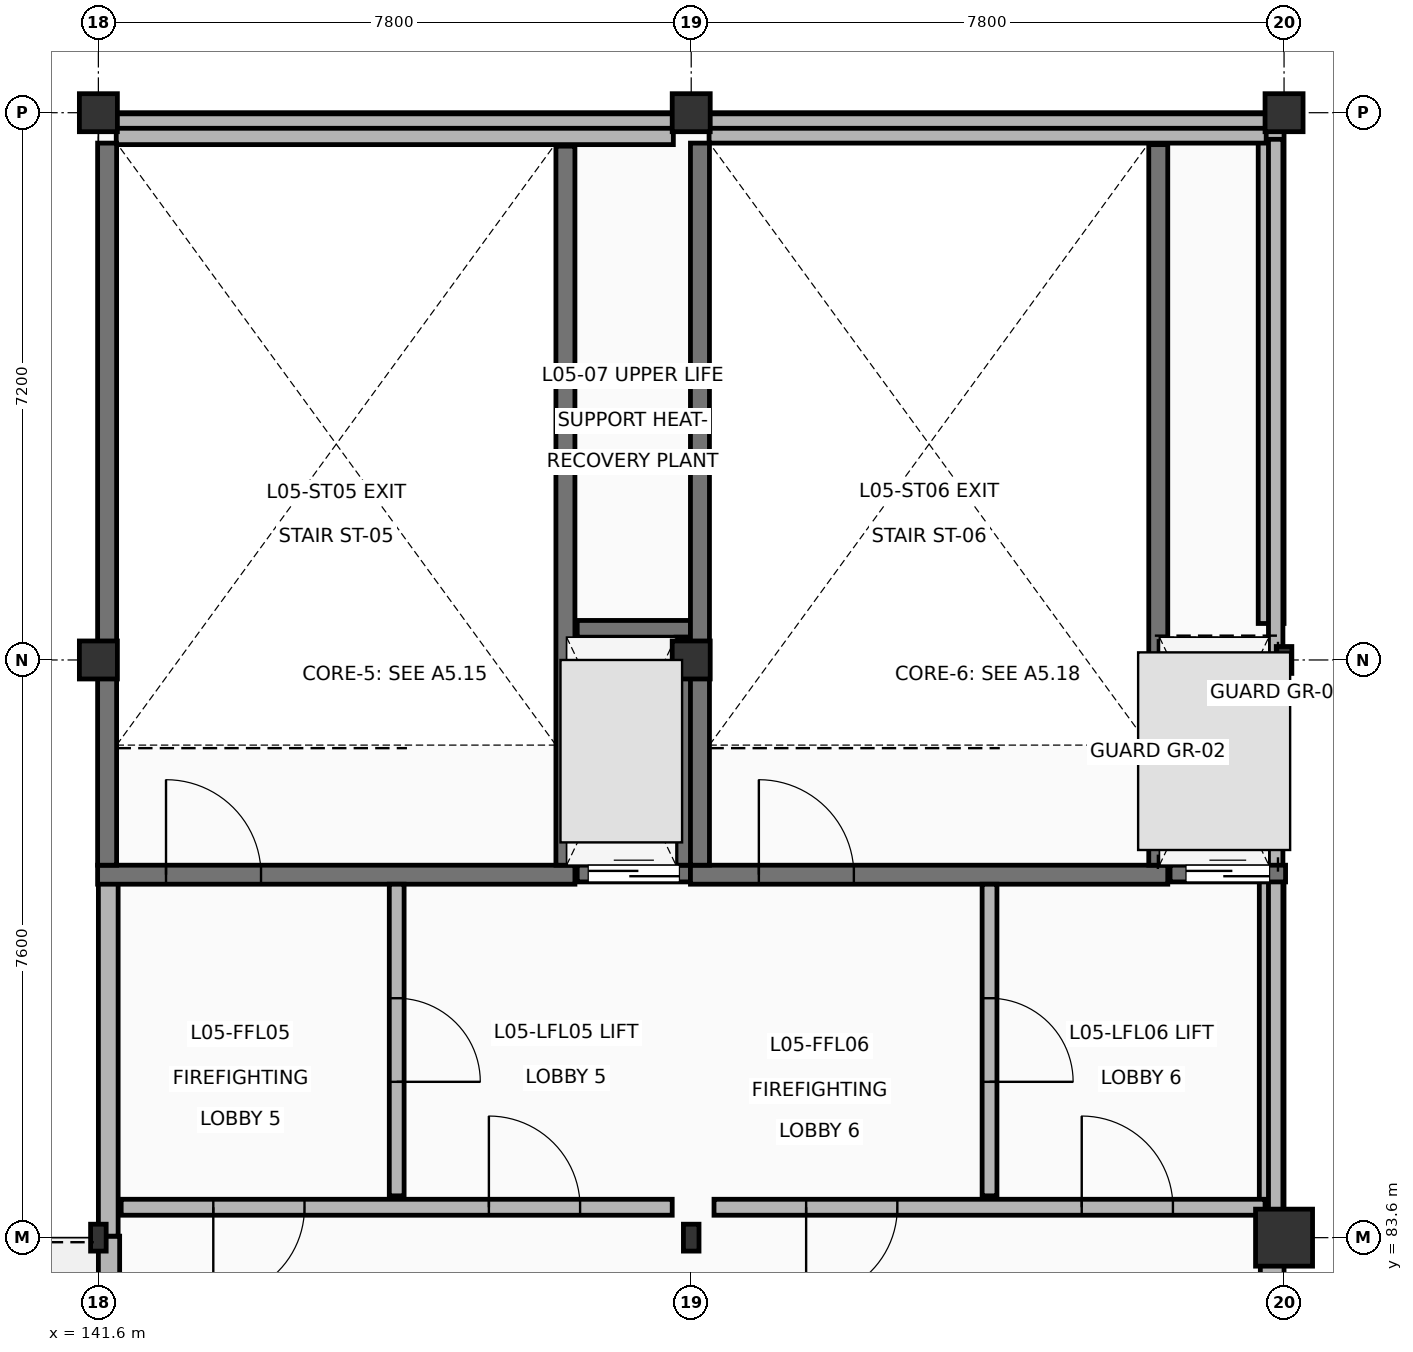
"""IFC4 building model, lengths in metres.
Left out: names, types, materials, properties, quantities, classifications, styles, units other than length and angle.
Written with IfcOpenShell. Run it as: python <this file> out.ifc"""

import sys

from ifc_helpers import new_model, si_unit, direction, frame, frame_2d, origin, origin_2d, place, context, subcontext, project, spatial, rectangle, circle, i_section, extrude, element, fill, save


model = new_model("IFC4")
c1 = context("Model", 3, precision=1e-05, world=origin(), true_north=direction((0.0, 1.0)))
c2 = subcontext(c1, "Body", "Model", "MODEL_VIEW")
j1 = project(units=[si_unit("LENGTHUNIT", "METRE"), si_unit("PLANEANGLEUNIT", "RADIAN")], contexts=[c1])
p1 = place(None, origin())
s1 = spatial("IfcSite", under=j1, at=p1, CompositionType="ELEMENT")
p2 = place(p1, origin())
s2 = spatial("IfcBuilding", under=s1, at=p2, CompositionType="ELEMENT")
p3 = place(p2, frame((0.0, 0.0, 19.8)))
s3 = spatial("IfcBuildingStorey", under=s2, at=p3, CompositionType="ELEMENT", Elevation=19.8)
p4 = place(p3, frame((141.6, 83.6, 0.0), z_axis=(0.0, 0.0, 1.0), x_axis=(1.0, 0.0, 0.0)))
e1 = element("IfcColumn", 1, at=p4, inside=s3, PredefinedType="COLUMN", context=c2, shape_type="SweptSolid", body=[
    extrude(i_section(OverallWidth=0.205, OverallDepth=0.354, WebThickness=0.01, FlangeThickness=0.017, at=origin_2d()), origin(), (0.0, 0.0, 1.0), 4.2),
])
for number, where, z_axis, x_axis in (
    (2, (141.6, 91.2, 0.0), (0.0, 0.0, 1.0), (1.0, 0.0, 0.0)),
    (3, (141.6, 98.4, 0.0), (0.0, 0.0, 1.0), (1.0, 0.0, 0.0)),
):
    element("IfcColumn", number, at=place(p3, frame(where, z_axis=z_axis, x_axis=x_axis)), inside=s3, PredefinedType="COLUMN", context=c2, shape_type="SweptSolid", body=[
        extrude(rectangle(XDim=0.5, YDim=0.5, at=origin_2d()), origin(), (0.0, 0.0, 1.0), 4.2),
    ])
p5 = place(p3, frame((149.4, 83.6, 0.0), z_axis=(0.0, 0.0, 1.0), x_axis=(1.0, 0.0, 0.0)))
e4 = element("IfcColumn", 4, at=p5, inside=s3, PredefinedType="COLUMN", context=c2, shape_type="SweptSolid", body=[
    extrude(i_section(OverallWidth=0.205, OverallDepth=0.354, WebThickness=0.01, FlangeThickness=0.017, at=origin_2d()), origin(), (0.0, 0.0, 1.0), 4.2),
])
for number, where, z_axis, x_axis in (
    (5, (149.4, 91.2, 0.0), (0.0, 0.0, 1.0), (1.0, 0.0, 0.0)),
    (6, (149.4, 98.4, 0.0), (0.0, 0.0, 1.0), (1.0, 0.0, 0.0)),
):
    element("IfcColumn", number, at=place(p3, frame(where, z_axis=z_axis, x_axis=x_axis)), inside=s3, PredefinedType="COLUMN", context=c2, shape_type="SweptSolid", body=[
        extrude(rectangle(XDim=0.5, YDim=0.5, at=origin_2d()), origin(), (0.0, 0.0, 1.0), 4.2),
    ])
p6 = place(p3, frame((157.2, 83.6, 0.0), z_axis=(0.0, 0.0, 1.0), x_axis=(1.0, 0.0, 0.0)))
e7 = element("IfcColumn", 7, at=p6, inside=s3, PredefinedType="COLUMN", context=c2, shape_type="SweptSolid", body=[
    extrude(circle(Radius=0.375, at=origin_2d()), origin(), (0.0, 0.0, 1.0), 4.2),
])
p7 = place(p3, frame((157.2, 91.2, 0.0), z_axis=(0.0, 0.0, 1.0), x_axis=(1.0, 0.0, 0.0)))
e8 = element("IfcColumn", 8, at=p7, inside=s3, PredefinedType="COLUMN", context=c2, shape_type="SweptSolid", body=[
    extrude(i_section(OverallWidth=0.205, OverallDepth=0.354, WebThickness=0.01, FlangeThickness=0.017, at=origin_2d()), origin(), (0.0, 0.0, 1.0), 4.2),
])
p8 = place(p3, frame((157.2, 98.4, 0.0), z_axis=(0.0, 0.0, 1.0), x_axis=(1.0, 0.0, 0.0)))
e9 = element("IfcColumn", 9, at=p8, inside=s3, PredefinedType="COLUMN", context=c2, shape_type="SweptSolid", body=[
    extrude(rectangle(XDim=0.5, YDim=0.5, at=origin_2d()), origin(), (0.0, 0.0, 1.0), 4.2),
])
p9 = place(p3, frame((157.03, 98.165, 0.0), z_axis=(0.0, 0.0, 1.0), x_axis=(0.0, -1.0, 0.0)))
e10 = element("IfcWall", 10, at=p9, inside=s3, PredefinedType="SOLIDWALL", context=c2, shape_type="SweptSolid", body=[
    extrude(rectangle(XDim=6.485, YDim=0.34, at=frame_2d((3.243, 0.0))), origin(), (0.0, 0.0, 1.0), 3.96),
])
p10 = place(p3, frame((157.037, 88.32, 0.0), z_axis=(0.0, 0.0, 1.0), x_axis=(0.0, -1.0, 0.0)))
e11 = element("IfcWall", 11, at=p10, inside=s3, PredefinedType="SOLIDWALL", context=c2, shape_type="SweptSolid", body=[
    extrude(rectangle(XDim=4.36, YDim=0.325, at=frame_2d((2.18, 0.0))), origin(), (0.0, 0.0, 1.0), 3.96),
])
p11 = place(p3, frame((157.044, 83.24, 0.0), z_axis=(0.0, 0.0, 1.0), x_axis=(0.0, -1.0, 0.0)))
e12 = element("IfcWall", 12, at=p11, inside=s3, PredefinedType="SOLIDWALL", context=c2, shape_type="SweptSolid", body=[
    extrude(rectangle(XDim=7.005, YDim=0.312, at=frame_2d((3.502, 0.0))), origin(), (0.0, 0.0, 1.0), 3.96),
])
p12 = place(p3, frame((141.74, 76.235, 0.0), z_axis=(0.0, 0.0, 1.0), x_axis=(0.0, 1.0, 0.0)))
e13 = element("IfcWall", 13, at=p12, inside=s3, PredefinedType="SOLIDWALL", context=c2, shape_type="SweptSolid", body=[
    extrude(rectangle(XDim=7.385, YDim=0.28, at=frame_2d((3.692, 0.0))), origin(), (0.0, 0.0, 1.0), 3.96),
])
p13 = place(p12, frame((2.793, 0.0, 0.0)))
e14 = element("IfcOpeningElement", 14, at=p13, cuts=e13, PredefinedType="OPENING", context=c2, shape_type="SweptSolid", body=[
    extrude(rectangle(XDim=1.8, YDim=2.3, at=frame_2d((0.9, 1.15))), frame((0.0, 0.15, 0.0), z_axis=(0.0, -1.0, 0.0), x_axis=(1.0, 0.0, 0.0)), (0.0, 0.0, 1.0), 0.3),
])
p14 = place(p3, frame((141.73, 83.62, 0.0), z_axis=(0.0, 0.0, 1.0), x_axis=(0.0, 1.0, 0.0)))
e15 = element("IfcWall", 15, at=p14, inside=s3, PredefinedType="SOLIDWALL", context=c2, shape_type="SweptSolid", body=[
    extrude(rectangle(XDim=4.76, YDim=0.26, at=frame_2d((2.38, 0.0))), origin(), (0.0, 0.0, 1.0), 3.96),
])
p15 = place(p3, frame((141.835, 98.19, 0.0), z_axis=(0.0, 0.0, 1.0), x_axis=(1.0, 0.0, 0.0)))
e16 = element("IfcWall", 16, at=p15, inside=s3, PredefinedType="SOLIDWALL", context=c2, shape_type="SweptSolid", body=[
    extrude(rectangle(XDim=7.33, YDim=0.42, at=frame_2d((3.665, 0.0))), origin(), (0.0, 0.0, 1.0), 3.96),
])
p16 = place(p3, frame((149.635, 98.2, 0.0), z_axis=(0.0, 0.0, 1.0), x_axis=(1.0, 0.0, 0.0)))
e17 = element("IfcWall", 17, at=p16, inside=s3, PredefinedType="SOLIDWALL", context=c2, shape_type="SweptSolid", body=[
    extrude(rectangle(XDim=7.33, YDim=0.4, at=frame_2d((3.665, 0.0))), origin(), (0.0, 0.0, 1.0), 3.96),
])
p17 = place(p3, frame((141.71, 98.29, 4.2), z_axis=(0.0, 0.0, 1.0), x_axis=(1.0, 0.0, 0.0)))
e18 = element("IfcWall", 18, at=p17, inside=s3, PredefinedType="PARAPET", context=c2, shape_type="SweptSolid", body=[
    extrude(rectangle(XDim=15.38, YDim=0.19, at=frame_2d((7.69, 0.0))), origin(), (0.0, 0.0, 1.0), 1.15),
])
p18 = place(p3, frame((157.09, 83.95, 4.2), z_axis=(0.0, 0.0, 1.0), x_axis=(0.0, 1.0, 0.0)))
e19 = element("IfcWall", 19, at=p18, inside=s3, PredefinedType="PARAPET", context=c2, shape_type="SweptSolid", body=[
    extrude(rectangle(XDim=14.1, YDim=0.19, at=frame_2d((7.05, 0.0))), origin(), (0.0, 0.0, 1.0), 1.15),
])
p19 = place(p3, frame((141.59, 88.375, 0.0), z_axis=(0.0, 0.0, 1.0), x_axis=(1.0, 0.0, 0.0)))
e20 = element("IfcWall", 20, at=p19, inside=s3, PredefinedType="SHEAR", context=c2, shape_type="SweptSolid", body=[
    extrude(rectangle(XDim=6.28, YDim=0.25, at=frame_2d((3.14, 0.0))), origin(), (0.0, 0.0, 1.0), 3.96),
])
p20 = place(p19, frame((0.9, 0.0, 0.0)))
e21 = element("IfcOpeningElement", 21, at=p20, cuts=e20, PredefinedType="OPENING", context=c2, shape_type="SweptSolid", body=[
    extrude(rectangle(XDim=1.25, YDim=2.2, at=frame_2d((0.625, 1.1))), frame((0.0, 0.135, 0.0), z_axis=(0.0, -1.0, 0.0), x_axis=(1.0, 0.0, 0.0)), (0.0, 0.0, 1.0), 0.27),
])
p21 = place(p3, frame((141.715, 88.5, 0.0), z_axis=(0.0, 0.0, 1.0), x_axis=(0.0, 1.0, 0.0)))
e22 = element("IfcWall", 22, at=p21, inside=s3, PredefinedType="SHEAR", context=c2, shape_type="SweptSolid", body=[
    extrude(rectangle(XDim=9.5, YDim=0.25, at=frame_2d((4.75, 0.0))), origin(), (0.0, 0.0, 1.0), 3.96),
])
p22 = place(p3, frame((147.745, 88.5, 0.0), z_axis=(0.0, 0.0, 1.0), x_axis=(0.0, 1.0, 0.0)))
e23 = element("IfcWall", 23, at=p22, inside=s3, PredefinedType="SHEAR", context=c2, shape_type="SweptSolid", body=[
    extrude(rectangle(XDim=9.46, YDim=0.25, at=frame_2d((4.73, 0.0))), origin(), (0.0, 0.0, 1.0), 3.96),
])
p23 = place(p3, frame((147.9, 88.39, 0.0), z_axis=(0.0, 0.0, 1.0), x_axis=(1.0, 0.0, 0.0)))
e24 = element("IfcWall", 24, at=p23, inside=s3, PredefinedType="SHEAR", context=c2, shape_type="SweptSolid", body=[
    extrude(rectangle(XDim=1.49, YDim=0.22, at=frame_2d((0.745, 0.0))), origin(), (0.0, 0.0, 1.0), 3.96),
])
p24 = place(p23, frame((0.145, 0.0, 0.0)))
e25 = element("IfcOpeningElement", 25, at=p24, cuts=e24, PredefinedType="OPENING", context=c2, shape_type="SweptSolid", body=[
    extrude(rectangle(XDim=1.2, YDim=2.2, at=frame_2d((0.6, 1.1))), frame((0.0, 0.12, 0.0), z_axis=(0.0, -1.0, 0.0), x_axis=(1.0, 0.0, 0.0)), (0.0, 0.0, 1.0), 0.24),
])
p25 = place(p3, frame((147.9, 91.61, 0.0), z_axis=(0.0, 0.0, 1.0), x_axis=(1.0, 0.0, 0.0)))
e26 = element("IfcWall", 26, at=p25, inside=s3, PredefinedType="SHEAR", context=c2, shape_type="SweptSolid", body=[
    extrude(rectangle(XDim=1.49, YDim=0.22, at=frame_2d((0.745, 0.0))), origin(), (0.0, 0.0, 1.0), 3.96),
])
p26 = place(p3, frame((149.31, 88.5, 0.0), z_axis=(0.0, 0.0, 1.0), x_axis=(0.0, 1.0, 0.0)))
e27 = element("IfcWall", 27, at=p26, inside=s3, PredefinedType="SHEAR", context=c2, shape_type="SweptSolid", body=[
    extrude(rectangle(XDim=3.0, YDim=0.22, at=frame_2d((1.5, 0.0))), origin(), (0.0, 0.0, 1.0), 3.96),
])
p27 = place(p3, frame((141.9, 84.0, 0.0), z_axis=(0.0, 0.0, 1.0), x_axis=(1.0, 0.0, 0.0)))
e28 = element("IfcWall", 28, at=p27, inside=s3, PredefinedType="PARTITIONING", context=c2, shape_type="SweptSolid", body=[
    extrude(rectangle(XDim=7.25, YDim=0.21, at=frame_2d((3.625, 0.0))), origin(), (0.0, 0.0, 1.0), 3.335),
])
p28 = place(p27, frame((1.212, 0.0, 0.0)))
e29 = element("IfcOpeningElement", 29, at=p28, cuts=e28, PredefinedType="OPENING", context=c2, shape_type="SweptSolid", body=[
    extrude(rectangle(XDim=1.2, YDim=2.2, at=frame_2d((0.6, 1.1))), frame((0.0, 0.115, 0.0), z_axis=(0.0, -1.0, 0.0), x_axis=(1.0, 0.0, 0.0)), (0.0, 0.0, 1.0), 0.23),
])
p29 = place(p27, frame((4.838, 0.0, 0.0)))
e30 = element("IfcOpeningElement", 30, at=p29, cuts=e28, PredefinedType="OPENING", context=c2, shape_type="SweptSolid", body=[
    extrude(rectangle(XDim=1.2, YDim=2.2, at=frame_2d((0.6, 1.1))), frame((0.0, 0.115, 0.0), z_axis=(0.0, -1.0, 0.0), x_axis=(1.0, 0.0, 0.0)), (0.0, 0.0, 1.0), 0.23),
])
p30 = place(p3, frame((145.525, 84.15, 0.0), z_axis=(0.0, 0.0, 1.0), x_axis=(0.0, 1.0, 0.0)))
e31 = element("IfcWall", 31, at=p30, inside=s3, PredefinedType="PARTITIONING", context=c2, shape_type="SweptSolid", body=[
    extrude(rectangle(XDim=4.1, YDim=0.195, at=frame_2d((2.05, 0.0))), origin(), (0.0, 0.0, 1.0), 3.335),
])
p31 = place(p30, frame((1.5, 0.0, 0.0)))
e32 = element("IfcOpeningElement", 32, at=p31, cuts=e31, PredefinedType="OPENING", context=c2, shape_type="SweptSolid", body=[
    extrude(rectangle(XDim=1.1, YDim=2.15, at=frame_2d((0.55, 1.075))), frame((0.0, 0.107, 0.0), z_axis=(0.0, -1.0, 0.0), x_axis=(1.0, 0.0, 0.0)), (0.0, 0.0, 1.0), 0.215),
])
p32 = place(p3, frame((149.39, 88.375, 0.0), z_axis=(0.0, 0.0, 1.0), x_axis=(1.0, 0.0, 0.0)))
e33 = element("IfcWall", 33, at=p32, inside=s3, PredefinedType="SHEAR", context=c2, shape_type="SweptSolid", body=[
    extrude(rectangle(XDim=6.28, YDim=0.25, at=frame_2d((3.14, 0.0))), origin(), (0.0, 0.0, 1.0), 3.96),
])
p33 = place(p32, frame((0.9, 0.0, 0.0)))
e34 = element("IfcOpeningElement", 34, at=p33, cuts=e33, PredefinedType="OPENING", context=c2, shape_type="SweptSolid", body=[
    extrude(rectangle(XDim=1.25, YDim=2.2, at=frame_2d((0.625, 1.1))), frame((0.0, 0.135, 0.0), z_axis=(0.0, -1.0, 0.0), x_axis=(1.0, 0.0, 0.0)), (0.0, 0.0, 1.0), 0.27),
])
p34 = place(p3, frame((149.515, 88.5, 0.0), z_axis=(0.0, 0.0, 1.0), x_axis=(0.0, 1.0, 0.0)))
e35 = element("IfcWall", 35, at=p34, inside=s3, PredefinedType="SHEAR", context=c2, shape_type="SweptSolid", body=[
    extrude(rectangle(XDim=9.5, YDim=0.25, at=frame_2d((4.75, 0.0))), origin(), (0.0, 0.0, 1.0), 3.96),
])
p35 = place(p3, frame((155.545, 88.5, 0.0), z_axis=(0.0, 0.0, 1.0), x_axis=(0.0, 1.0, 0.0)))
e36 = element("IfcWall", 36, at=p35, inside=s3, PredefinedType="SHEAR", context=c2, shape_type="SweptSolid", body=[
    extrude(rectangle(XDim=9.48, YDim=0.25, at=frame_2d((4.74, 0.0))), origin(), (0.0, 0.0, 1.0), 3.96),
])
p36 = place(p3, frame((155.7, 88.39, 0.0), z_axis=(0.0, 0.0, 1.0), x_axis=(1.0, 0.0, 0.0)))
e37 = element("IfcWall", 37, at=p36, inside=s3, PredefinedType="SHEAR", context=c2, shape_type="SweptSolid", body=[
    extrude(rectangle(XDim=1.52, YDim=0.22, at=frame_2d((0.76, 0.0))), origin(), (0.0, 0.0, 1.0), 3.96),
])
p37 = place(p36, frame((0.21, 0.0, 0.0)))
e38 = element("IfcOpeningElement", 38, at=p37, cuts=e37, PredefinedType="OPENING", context=c2, shape_type="SweptSolid", body=[
    extrude(rectangle(XDim=1.1, YDim=2.15, at=frame_2d((0.55, 1.075))), frame((0.0, 0.12, 0.0), z_axis=(0.0, -1.0, 0.0), x_axis=(1.0, 0.0, 0.0)), (0.0, 0.0, 1.0), 0.24),
])
p38 = place(p3, frame((149.7, 84.0, 0.0), z_axis=(0.0, 0.0, 1.0), x_axis=(1.0, 0.0, 0.0)))
e39 = element("IfcWall", 39, at=p38, inside=s3, PredefinedType="PARTITIONING", context=c2, shape_type="SweptSolid", body=[
    extrude(rectangle(XDim=7.25, YDim=0.21, at=frame_2d((3.625, 0.0))), origin(), (0.0, 0.0, 1.0), 3.335),
])
p39 = place(p38, frame((1.212, 0.0, 0.0)))
e40 = element("IfcOpeningElement", 40, at=p39, cuts=e39, PredefinedType="OPENING", context=c2, shape_type="SweptSolid", body=[
    extrude(rectangle(XDim=1.2, YDim=2.2, at=frame_2d((0.6, 1.1))), frame((0.0, 0.115, 0.0), z_axis=(0.0, -1.0, 0.0), x_axis=(1.0, 0.0, 0.0)), (0.0, 0.0, 1.0), 0.23),
])
p40 = place(p38, frame((4.838, 0.0, 0.0)))
e41 = element("IfcOpeningElement", 41, at=p40, cuts=e39, PredefinedType="OPENING", context=c2, shape_type="SweptSolid", body=[
    extrude(rectangle(XDim=1.2, YDim=2.2, at=frame_2d((0.6, 1.1))), frame((0.0, 0.115, 0.0), z_axis=(0.0, -1.0, 0.0), x_axis=(1.0, 0.0, 0.0)), (0.0, 0.0, 1.0), 0.23),
])
p41 = place(p3, frame((153.325, 84.15, 0.0), z_axis=(0.0, 0.0, 1.0), x_axis=(0.0, 1.0, 0.0)))
e42 = element("IfcWall", 42, at=p41, inside=s3, PredefinedType="PARTITIONING", context=c2, shape_type="SweptSolid", body=[
    extrude(rectangle(XDim=4.1, YDim=0.195, at=frame_2d((2.05, 0.0))), origin(), (0.0, 0.0, 1.0), 3.335),
])
p42 = place(p41, frame((1.5, 0.0, 0.0)))
e43 = element("IfcOpeningElement", 43, at=p42, cuts=e42, PredefinedType="OPENING", context=c2, shape_type="SweptSolid", body=[
    extrude(rectangle(XDim=1.1, YDim=2.15, at=frame_2d((0.55, 1.075))), frame((0.0, 0.107, 0.0), z_axis=(0.0, -1.0, 0.0), x_axis=(1.0, 0.0, 0.0)), (0.0, 0.0, 1.0), 0.215),
])
p43 = place(p20, origin())
e44 = element("IfcDoor", 44, at=p43, inside=s3, OperationType="SINGLE_SWING_LEFT", PredefinedType="DOOR", context=c2, shape_type="SweptSolid", body=[
    extrude(rectangle(XDim=1.25, YDim=2.2, at=frame_2d((0.625, 1.1))), frame((0.0, 0.025, 0.0), z_axis=(0.0, -1.0, 0.0), x_axis=(1.0, 0.0, 0.0)), (0.0, 0.0, 1.0), 0.05),
])
fill(e21, e44)
p44 = place(p24, origin())
e45 = element("IfcDoor", 45, at=p44, inside=s3, OperationType="DOUBLE_DOOR_SLIDING", PredefinedType="DOOR", context=c2, shape_type="SweptSolid", body=[
    extrude(rectangle(XDim=1.2, YDim=2.2, at=frame_2d((0.6, 1.1))), frame((0.0, 0.025, 0.0), z_axis=(0.0, -1.0, 0.0), x_axis=(1.0, 0.0, 0.0)), (0.0, 0.0, 1.0), 0.05),
])
fill(e25, e45)
p45 = place(p28, origin())
e46 = element("IfcDoor", 46, at=p45, inside=s3, OperationType="SINGLE_SWING_RIGHT", PredefinedType="DOOR", context=c2, shape_type="SweptSolid", body=[
    extrude(rectangle(XDim=1.2, YDim=2.2, at=frame_2d((0.6, 1.1))), frame((0.0, 0.025, 0.0), z_axis=(0.0, -1.0, 0.0), x_axis=(1.0, 0.0, 0.0)), (0.0, 0.0, 1.0), 0.05),
])
fill(e29, e46)
p46 = place(p29, origin())
e47 = element("IfcDoor", 47, at=p46, inside=s3, OperationType="SINGLE_SWING_LEFT", PredefinedType="DOOR", context=c2, shape_type="SweptSolid", body=[
    extrude(rectangle(XDim=1.2, YDim=2.2, at=frame_2d((0.6, 1.1))), frame((0.0, 0.025, 0.0), z_axis=(0.0, -1.0, 0.0), x_axis=(1.0, 0.0, 0.0)), (0.0, 0.0, 1.0), 0.05),
])
fill(e30, e47)
p47 = place(p31, origin())
e48 = element("IfcDoor", 48, at=p47, inside=s3, OperationType="SINGLE_SWING_RIGHT", PredefinedType="DOOR", context=c2, shape_type="SweptSolid", body=[
    extrude(rectangle(XDim=1.1, YDim=2.15, at=frame_2d((0.55, 1.075))), frame((0.0, 0.025, 0.0), z_axis=(0.0, -1.0, 0.0), x_axis=(1.0, 0.0, 0.0)), (0.0, 0.0, 1.0), 0.05),
])
fill(e32, e48)
p48 = place(p33, origin())
e49 = element("IfcDoor", 49, at=p48, inside=s3, OperationType="SINGLE_SWING_LEFT", PredefinedType="DOOR", context=c2, shape_type="SweptSolid", body=[
    extrude(rectangle(XDim=1.25, YDim=2.2, at=frame_2d((0.625, 1.1))), frame((0.0, 0.025, 0.0), z_axis=(0.0, -1.0, 0.0), x_axis=(1.0, 0.0, 0.0)), (0.0, 0.0, 1.0), 0.05),
])
fill(e34, e49)
p49 = place(p37, origin())
e50 = element("IfcDoor", 50, at=p49, inside=s3, OperationType="DOUBLE_DOOR_SLIDING", PredefinedType="DOOR", context=c2, shape_type="SweptSolid", body=[
    extrude(rectangle(XDim=1.1, YDim=2.15, at=frame_2d((0.55, 1.075))), frame((0.0, 0.025, 0.0), z_axis=(0.0, -1.0, 0.0), x_axis=(1.0, 0.0, 0.0)), (0.0, 0.0, 1.0), 0.05),
])
fill(e38, e50)
p50 = place(p39, origin())
e51 = element("IfcDoor", 51, at=p50, inside=s3, OperationType="SINGLE_SWING_RIGHT", PredefinedType="DOOR", context=c2, shape_type="SweptSolid", body=[
    extrude(rectangle(XDim=1.2, YDim=2.2, at=frame_2d((0.6, 1.1))), frame((0.0, 0.025, 0.0), z_axis=(0.0, -1.0, 0.0), x_axis=(1.0, 0.0, 0.0)), (0.0, 0.0, 1.0), 0.05),
])
fill(e40, e51)
p51 = place(p40, origin())
e52 = element("IfcDoor", 52, at=p51, inside=s3, OperationType="SINGLE_SWING_LEFT", PredefinedType="DOOR", context=c2, shape_type="SweptSolid", body=[
    extrude(rectangle(XDim=1.2, YDim=2.2, at=frame_2d((0.6, 1.1))), frame((0.0, 0.025, 0.0), z_axis=(0.0, -1.0, 0.0), x_axis=(1.0, 0.0, 0.0)), (0.0, 0.0, 1.0), 0.05),
])
fill(e41, e52)
p52 = place(p42, origin())
e53 = element("IfcDoor", 53, at=p52, inside=s3, OperationType="SINGLE_SWING_RIGHT", PredefinedType="DOOR", context=c2, shape_type="SweptSolid", body=[
    extrude(rectangle(XDim=1.1, YDim=2.15, at=frame_2d((0.55, 1.075))), frame((0.0, 0.025, 0.0), z_axis=(0.0, -1.0, 0.0), x_axis=(1.0, 0.0, 0.0)), (0.0, 0.0, 1.0), 0.05),
])
fill(e43, e53)
save(model, sys.argv[1])
